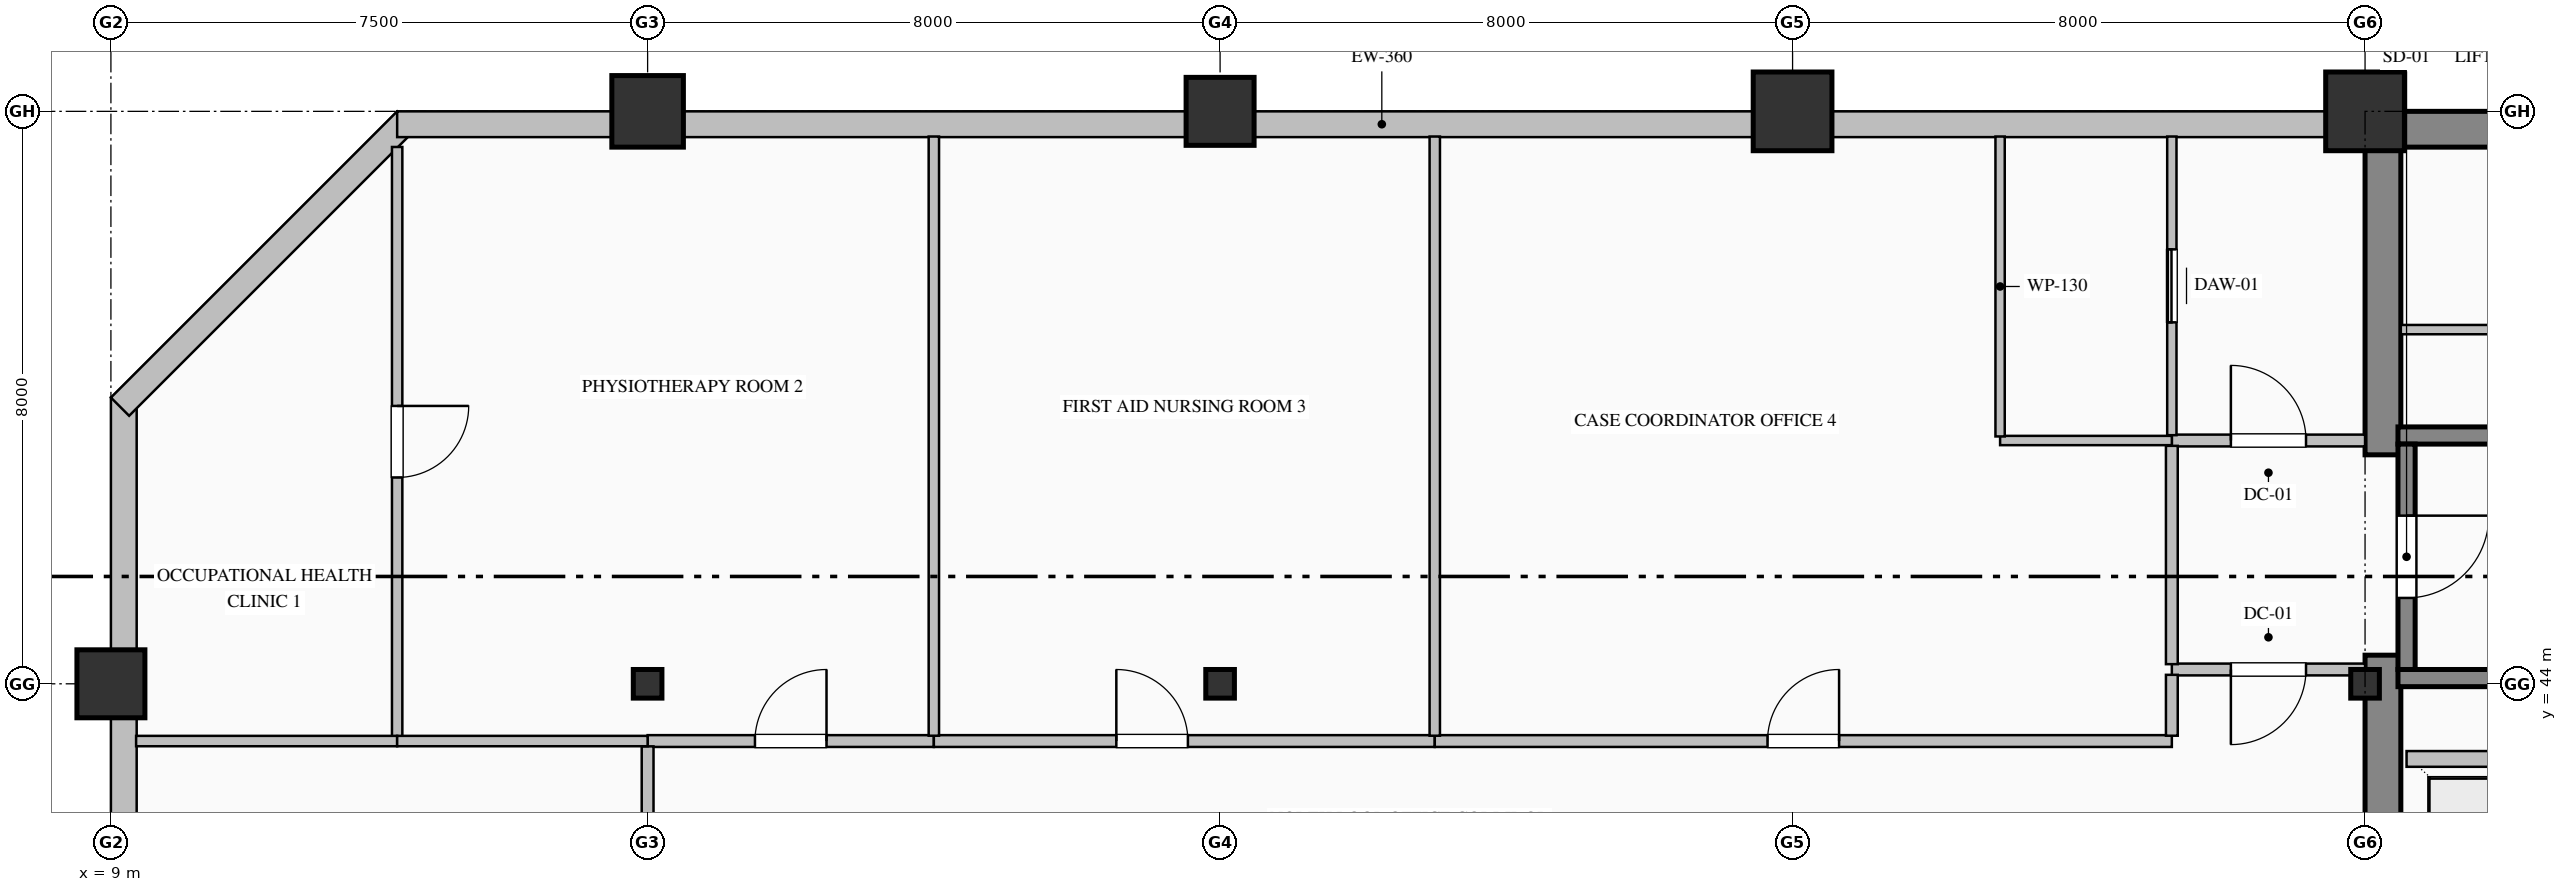
"""IFC4 building model, lengths in metres.
Left out: names, types, materials, properties, quantities, classifications, styles, units other than length and angle.
Written with IfcOpenShell. Run it as: python <this file> out.ifc"""

import sys

from ifc_helpers import new_model, si_unit, direction, frame, frame_2d, origin, origin_2d, place, context, subcontext, project, spatial, rectangle, hollow_rectangle, hollow_circle, i_section, extrude, element, fill, save


model = new_model("IFC4")
c1 = context("Model", 3, precision=1e-05, world=origin(), true_north=direction((0.0, 1.0)))
c2 = subcontext(c1, "Body", "Model", "MODEL_VIEW")
j1 = project(units=[si_unit("LENGTHUNIT", "METRE"), si_unit("PLANEANGLEUNIT", "RADIAN")], contexts=[c1])
p1 = place(None, origin())
s1 = spatial("IfcSite", under=j1, at=p1, CompositionType="ELEMENT")
p2 = place(p1, origin())
s2 = spatial("IfcBuilding", under=s1, at=p2, CompositionType="ELEMENT")
p3 = place(p2, frame((0.0, 0.0, 175.0)))
s3 = spatial("IfcBuildingStorey", under=s2, at=p3, CompositionType="ELEMENT", Elevation=175.0)
p4 = place(p3, frame((40.5, 51.75, 0.0), z_axis=(0.0, 0.0, 1.0), x_axis=(1.0, 0.0, 0.0)))
e1 = element("IfcWall", 1, at=p4, inside=s3, PredefinedType="SHEAR", context=c2, shape_type="SweptSolid", body=[
    extrude(rectangle(XDim=23.5, YDim=0.5, at=frame_2d((11.75, 0.0))), origin(), (0.0, 0.0, 1.0), 3.765),
])
p5 = place(p3, frame((40.75, 36.5, 0.0), z_axis=(0.0, 0.0, 1.0), x_axis=(0.0, 1.0, 0.0)))
e2 = element("IfcWall", 2, at=p5, inside=s3, PredefinedType="SHEAR", context=c2, shape_type="SweptSolid", body=[
    extrude(rectangle(XDim=7.9, YDim=0.5, at=frame_2d((3.95, 0.0))), origin(), (0.0, 0.0, 1.0), 3.765),
])
p6 = place(p3, frame((40.75, 47.2, 0.0), z_axis=(0.0, 0.0, 1.0), x_axis=(0.0, 1.0, 0.0)))
e3 = element("IfcWall", 3, at=p6, inside=s3, PredefinedType="SHEAR", context=c2, shape_type="SweptSolid", body=[
    extrude(rectangle(XDim=4.3, YDim=0.5, at=frame_2d((2.15, 0.0))), origin(), (0.0, 0.0, 1.0), 3.765),
])
p7 = place(p3, frame((9.0, 44.0, 0.0), z_axis=(0.0, 0.0, 1.0), x_axis=(1.0, 0.0, 0.0)))
e4 = element("IfcColumn", 4, at=p7, inside=s3, PredefinedType="COLUMN", context=c2, shape_type="SweptSolid", body=[
    extrude(hollow_rectangle(XDim=0.95, YDim=0.95, WallThickness=0.036, at=origin_2d()), origin(), (0.0, 0.0, 1.0), 4.0),
])
p8 = place(p3, frame((16.5, 44.0, 0.0), z_axis=(0.0, 0.0, 1.0), x_axis=(1.0, 0.0, 0.0)))
e5 = element("IfcColumn", 5, at=p8, inside=s3, PredefinedType="COLUMN", context=c2, shape_type="SweptSolid", body=[
    extrude(i_section(OverallWidth=0.4, OverallDepth=0.4, WebThickness=0.013, FlangeThickness=0.021, FilletRadius=0.022, at=origin_2d()), origin(), (0.0, 0.0, 1.0), 4.0),
])
p9 = place(p3, frame((16.5, 52.0, 0.0), z_axis=(0.0, 0.0, 1.0), x_axis=(1.0, 0.0, 0.0)))
e6 = element("IfcColumn", 6, at=p9, inside=s3, PredefinedType="COLUMN", context=c2, shape_type="SweptSolid", body=[
    extrude(hollow_circle(Radius=0.5, WallThickness=0.036, at=origin_2d()), origin(), (0.0, 0.0, 1.0), 4.0),
])
p10 = place(p3, frame((24.5, 44.0, 0.0), z_axis=(0.0, 0.0, 1.0), x_axis=(1.0, 0.0, 0.0)))
e7 = element("IfcColumn", 7, at=p10, inside=s3, PredefinedType="COLUMN", context=c2, shape_type="SweptSolid", body=[
    extrude(i_section(OverallWidth=0.4, OverallDepth=0.4, WebThickness=0.013, FlangeThickness=0.021, FilletRadius=0.022, at=origin_2d()), origin(), (0.0, 0.0, 1.0), 4.0),
])
p11 = place(p3, frame((24.5, 52.0, 0.0), z_axis=(0.0, 0.0, 1.0), x_axis=(1.0, 0.0, 0.0)))
e8 = element("IfcColumn", 8, at=p11, inside=s3, PredefinedType="COLUMN", context=c2, shape_type="SweptSolid", body=[
    extrude(hollow_rectangle(XDim=0.95, YDim=0.95, WallThickness=0.036, at=origin_2d()), origin(), (0.0, 0.0, 1.0), 4.0),
])
p12 = place(p3, frame((32.5, 52.0, 0.0), z_axis=(0.0, 0.0, 1.0), x_axis=(1.0, 0.0, 0.0)))
e9 = element("IfcColumn", 9, at=p12, inside=s3, PredefinedType="COLUMN", context=c2, shape_type="SweptSolid", body=[
    extrude(hollow_rectangle(XDim=1.1, YDim=1.1, WallThickness=0.04, at=origin_2d()), origin(), (0.0, 0.0, 1.0), 4.0),
])
p13 = place(p3, frame((40.5, 44.0, 0.0), z_axis=(0.0, 0.0, 1.0), x_axis=(1.0, 0.0, 0.0)))
e10 = element("IfcColumn", 10, at=p13, inside=s3, PredefinedType="COLUMN", context=c2, shape_type="SweptSolid", body=[
    extrude(i_section(OverallWidth=0.4, OverallDepth=0.4, WebThickness=0.013, FlangeThickness=0.021, FilletRadius=0.022, at=origin_2d()), origin(), (0.0, 0.0, 1.0), 4.0),
])
p14 = place(p3, frame((40.5, 52.0, 0.0), z_axis=(0.0, 0.0, 1.0), x_axis=(1.0, 0.0, 0.0)))
e11 = element("IfcColumn", 11, at=p14, inside=s3, PredefinedType="COLUMN", context=c2, shape_type="SweptSolid", body=[
    extrude(hollow_rectangle(XDim=1.1, YDim=1.1, WallThickness=0.04, at=origin_2d()), origin(), (0.0, 0.0, 1.0), 4.0),
])
p15 = place(p3, frame((9.18, 32.0, 0.0), z_axis=(0.0, 0.0, 1.0), x_axis=(0.0, 1.0, 0.0)))
e12 = element("IfcWall", 12, at=p15, inside=s3, PredefinedType="SOLIDWALL", context=c2, shape_type="SweptSolid", body=[
    extrude(rectangle(XDim=16.0, YDim=0.36, at=frame_2d((8.0, 0.0))), origin(), (0.0, 0.0, 1.0), 3.265),
])
p16 = place(p15, frame((6.375, 0.0, 0.85)))
e13 = element("IfcOpeningElement", 13, at=p16, cuts=e12, PredefinedType="OPENING", context=c2, shape_type="SweptSolid", body=[
    extrude(rectangle(XDim=1.65, YDim=1.95, at=frame_2d((0.825, 0.975))), frame((0.0, 0.19, 0.0), z_axis=(0.0, -1.0, 0.0), x_axis=(1.0, 0.0, 0.0)), (0.0, 0.0, 1.0), 0.38),
])
p17 = place(p3, frame((9.127, 47.873, 0.0), z_axis=(0.0, 0.0, 1.0), x_axis=(0.707106781187, 0.707106781187, 0.0)))
e14 = element("IfcWall", 14, at=p17, inside=s3, PredefinedType="SOLIDWALL", context=c2, shape_type="SweptSolid", body=[
    extrude(rectangle(XDim=5.657, YDim=0.36, at=frame_2d((2.828, 0.0))), origin(), (0.0, 0.0, 1.0), 3.765),
])
p18 = place(p3, frame((13.0, 51.82, 0.0), z_axis=(0.0, 0.0, 1.0), x_axis=(1.0, 0.0, 0.0)))
e15 = element("IfcWall", 15, at=p18, inside=s3, PredefinedType="SOLIDWALL", context=c2, shape_type="SweptSolid", body=[
    extrude(rectangle(XDim=27.52, YDim=0.36, at=frame_2d((13.76, 0.0))), origin(), (0.0, 0.0, 1.0), 3.265),
])
for number, where, z_axis, x_axis in (
    (16, (40.96, 47.47, 0.0), (0.0, 0.0, 1.0), (1.0, 0.0, 0.0)),
    (17, (49.04, 44.08, 0.0), (0.0, 0.0, 1.0), (-1.0, 0.0, 0.0)),
):
    element("IfcWall", number, at=place(p3, frame(where, z_axis=z_axis, x_axis=x_axis)), inside=s3, PredefinedType="SOLIDWALL", context=c2, shape_type="SweptSolid", body=[
        extrude(rectangle(XDim=8.08, YDim=0.24, at=frame_2d((4.04, 0.0))), origin(), (0.0, 0.0, 1.0), 4.0),
    ])
p19 = place(p3, frame((41.08, 47.35, 0.0), z_axis=(0.0, 0.0, 1.0), x_axis=(0.0, -1.0, 0.0)))
e18 = element("IfcWall", 18, at=p19, inside=s3, PredefinedType="SOLIDWALL", context=c2, shape_type="SweptSolid", body=[
    extrude(rectangle(XDim=3.15, YDim=0.24, at=frame_2d((1.575, 0.0))), origin(), (0.0, 0.0, 1.0), 4.0),
])
p20 = place(p19, frame((1.0, 0.0, 0.0)))
e19 = element("IfcOpeningElement", 19, at=p20, cuts=e18, PredefinedType="OPENING", context=c2, shape_type="SweptSolid", body=[
    extrude(rectangle(XDim=1.15, YDim=2.2, at=frame_2d((0.575, 1.1))), frame((0.0, 0.13, 0.0), z_axis=(0.0, -1.0, 0.0), x_axis=(1.0, 0.0, 0.0)), (0.0, 0.0, 1.0), 0.26),
])
p21 = place(p3, frame((41.08, 42.95, 0.0), z_axis=(0.0, 0.0, 1.0), x_axis=(1.0, 0.0, 0.0)))
e20 = element("IfcWall", 20, at=p21, inside=s3, PredefinedType="PARTITIONING", context=c2, shape_type="SweptSolid", body=[
    extrude(rectangle(XDim=8.24, YDim=0.22, at=frame_2d((4.12, 0.0))), origin(), (0.0, 0.0, 1.0), 3.765),
])
p22 = place(p3, frame((37.8, 47.4, 0.0), z_axis=(0.0, 0.0, 1.0), x_axis=(1.0, 0.0, 0.0)))
e21 = element("IfcWall", 21, at=p22, inside=s3, PredefinedType="PARTITIONING", context=c2, shape_type="SweptSolid", body=[
    extrude(rectangle(XDim=2.7, YDim=0.165, at=frame_2d((1.35, 0.0))), origin(), (0.0, 0.0, 1.0), 3.765),
])
p23 = place(p22, frame((0.825, 0.0, 0.0)))
e22 = element("IfcOpeningElement", 22, at=p23, cuts=e21, PredefinedType="OPENING", context=c2, shape_type="SweptSolid", body=[
    extrude(rectangle(XDim=1.05, YDim=2.15, at=frame_2d((0.525, 1.075))), frame((0.0, 0.093, 0.0), z_axis=(0.0, -1.0, 0.0), x_axis=(1.0, 0.0, 0.0)), (0.0, 0.0, 1.0), 0.185),
])
p24 = place(p3, frame((40.5, 44.2, 0.0), z_axis=(0.0, 0.0, 1.0), x_axis=(-1.0, 0.0, 0.0)))
e23 = element("IfcWall", 23, at=p24, inside=s3, PredefinedType="PARTITIONING", context=c2, shape_type="SweptSolid", body=[
    extrude(rectangle(XDim=2.7, YDim=0.165, at=frame_2d((1.35, 0.0))), origin(), (0.0, 0.0, 1.0), 3.765),
])
p25 = place(p24, frame((0.825, 0.0, 0.0)))
e24 = element("IfcOpeningElement", 24, at=p25, cuts=e23, PredefinedType="OPENING", context=c2, shape_type="SweptSolid", body=[
    extrude(rectangle(XDim=1.05, YDim=2.15, at=frame_2d((0.525, 1.075))), frame((0.0, 0.093, 0.0), z_axis=(0.0, -1.0, 0.0), x_axis=(1.0, 0.0, 0.0)), (0.0, 0.0, 1.0), 0.185),
])
p26 = place(p3, frame((37.8, 44.274, 0.0), z_axis=(0.0, 0.0, 1.0), x_axis=(0.0, 1.0, 0.0)))
e25 = element("IfcWall", 25, at=p26, inside=s3, PredefinedType="PARTITIONING", context=c2, shape_type="SweptSolid", body=[
    extrude(rectangle(XDim=3.051, YDim=0.165, at=frame_2d((1.525, 0.0))), origin(), (0.0, 0.0, 1.0), 3.765),
])
p27 = place(p3, frame((37.8, 47.475, 0.0), z_axis=(0.0, 0.0, 1.0), x_axis=(0.0, 1.0, 0.0)))
e26 = element("IfcWall", 26, at=p27, inside=s3, PredefinedType="PARTITIONING", context=c2, shape_type="SweptSolid", body=[
    extrude(rectangle(XDim=4.173, YDim=0.13, at=frame_2d((2.087, 0.0))), origin(), (0.0, 0.0, 1.0), 3.765),
])
p28 = place(p27, frame((1.577, 0.0, 0.0)))
e27 = element("IfcOpeningElement", 27, at=p28, cuts=e26, PredefinedType="OPENING", context=c2, shape_type="SweptSolid", body=[
    extrude(rectangle(XDim=1.02, YDim=2.15, at=frame_2d((0.51, 1.075))), frame((0.0, 0.075, 0.0), z_axis=(0.0, -1.0, 0.0), x_axis=(1.0, 0.0, 0.0)), (0.0, 0.0, 1.0), 0.15),
])
p29 = place(p3, frame((37.8, 47.4, 0.0), z_axis=(0.0, 0.0, 1.0), x_axis=(-1.0, 0.0, 0.0)))
e28 = element("IfcWall", 28, at=p29, inside=s3, PredefinedType="PARTITIONING", context=c2, shape_type="SweptSolid", body=[
    extrude(rectangle(XDim=2.4, YDim=0.13, at=frame_2d((1.2, 0.0))), origin(), (0.0, 0.0, 1.0), 3.765),
])
p30 = place(p3, frame((35.4, 47.457, 0.0), z_axis=(0.0, 0.0, 1.0), x_axis=(0.0, 1.0, 0.0)))
e29 = element("IfcWall", 29, at=p30, inside=s3, PredefinedType="PARTITIONING", context=c2, shape_type="SweptSolid", body=[
    extrude(rectangle(XDim=4.191, YDim=0.13, at=frame_2d((2.095, 0.0))), origin(), (0.0, 0.0, 1.0), 3.765),
])
p31 = place(p3, frame((41.0, 48.95, 0.0), z_axis=(0.0, 0.0, 1.0), x_axis=(1.0, 0.0, 0.0)))
e30 = element("IfcWall", 30, at=p31, inside=s3, PredefinedType="PARTITIONING", context=c2, shape_type="SweptSolid", body=[
    extrude(rectangle(XDim=5.8, YDim=0.13, at=frame_2d((2.9, 0.0))), origin(), (0.0, 0.0, 1.0), 3.765),
])
p32 = place(p31, frame((2.44, 0.0, 0.0)))
e31 = element("IfcOpeningElement", 31, at=p32, cuts=e30, PredefinedType="OPENING", context=c2, shape_type="SweptSolid", body=[
    extrude(rectangle(XDim=0.92, YDim=2.15, at=frame_2d((0.46, 1.075))), frame((0.0, 0.075, 0.0), z_axis=(0.0, -1.0, 0.0), x_axis=(1.0, 0.0, 0.0)), (0.0, 0.0, 1.0), 0.15),
])
p33 = place(p3, frame((16.5, 43.2, 0.0), z_axis=(0.0, 0.0, 1.0), x_axis=(1.0, 0.0, 0.0)))
e32 = element("IfcWall", 32, at=p33, inside=s3, PredefinedType="PARTITIONING", context=c2, shape_type="SweptSolid", body=[
    extrude(rectangle(XDim=4.0, YDim=0.165, at=frame_2d((2.0, 0.0))), origin(), (0.0, 0.0, 1.0), 3.765),
])
p34 = place(p33, frame((1.5, 0.0, 0.0)))
e33 = element("IfcOpeningElement", 33, at=p34, cuts=e32, PredefinedType="OPENING", context=c2, shape_type="SweptSolid", body=[
    extrude(rectangle(XDim=1.0, YDim=2.15, at=frame_2d((0.5, 1.075))), frame((0.0, 0.093, 0.0), z_axis=(0.0, -1.0, 0.0), x_axis=(1.0, 0.0, 0.0)), (0.0, 0.0, 1.0), 0.185),
])
p35 = place(p3, frame((20.5, 43.2, 0.0), z_axis=(0.0, 0.0, 1.0), x_axis=(1.0, 0.0, 0.0)))
e34 = element("IfcWall", 34, at=p35, inside=s3, PredefinedType="PARTITIONING", context=c2, shape_type="SweptSolid", body=[
    extrude(rectangle(XDim=7.0, YDim=0.165, at=frame_2d((3.5, 0.0))), origin(), (0.0, 0.0, 1.0), 3.765),
])
p36 = place(p35, frame((2.55, 0.0, 0.0)))
e35 = element("IfcOpeningElement", 35, at=p36, cuts=e34, PredefinedType="OPENING", context=c2, shape_type="SweptSolid", body=[
    extrude(rectangle(XDim=1.0, YDim=2.15, at=frame_2d((0.5, 1.075))), frame((0.0, 0.093, 0.0), z_axis=(0.0, -1.0, 0.0), x_axis=(1.0, 0.0, 0.0)), (0.0, 0.0, 1.0), 0.185),
])
p37 = place(p3, frame((27.5, 43.2, 0.0), z_axis=(0.0, 0.0, 1.0), x_axis=(1.0, 0.0, 0.0)))
e36 = element("IfcWall", 36, at=p37, inside=s3, PredefinedType="PARTITIONING", context=c2, shape_type="SweptSolid", body=[
    extrude(rectangle(XDim=10.3, YDim=0.165, at=frame_2d((5.15, 0.0))), origin(), (0.0, 0.0, 1.0), 3.765),
])
p38 = place(p37, frame((4.65, 0.0, 0.0)))
e37 = element("IfcOpeningElement", 37, at=p38, cuts=e36, PredefinedType="OPENING", context=c2, shape_type="SweptSolid", body=[
    extrude(rectangle(XDim=1.0, YDim=2.15, at=frame_2d((0.5, 1.075))), frame((0.0, 0.093, 0.0), z_axis=(0.0, -1.0, 0.0), x_axis=(1.0, 0.0, 0.0)), (0.0, 0.0, 1.0), 0.185),
])
p39 = place(p3, frame((16.5, 41.0, 0.0), z_axis=(0.0, 0.0, 1.0), x_axis=(0.0, 1.0, 0.0)))
e38 = element("IfcWall", 38, at=p39, inside=s3, PredefinedType="PARTITIONING", context=c2, shape_type="SweptSolid", body=[
    extrude(rectangle(XDim=2.125, YDim=0.165, at=frame_2d((1.063, 0.0))), origin(), (0.0, 0.0, 1.0), 3.157),
])
p40 = place(p3, frame((37.8, 43.274, 0.0), z_axis=(0.0, 0.0, 1.0), x_axis=(0.0, 1.0, 0.0)))
e39 = element("IfcWall", 39, at=p40, inside=s3, PredefinedType="PARTITIONING", context=c2, shape_type="SweptSolid", body=[
    extrude(rectangle(XDim=0.851, YDim=0.165, at=frame_2d((0.426, 0.0))), origin(), (0.0, 0.0, 1.0), 3.765),
])
p41 = place(p3, frame((13.0, 51.502, 0.0), z_axis=(0.0, 0.0, 1.0), x_axis=(0.0, -1.0, 0.0)))
e40 = element("IfcWall", 40, at=p41, inside=s3, PredefinedType="PARTITIONING", context=c2, shape_type="SweptSolid", body=[
    extrude(rectangle(XDim=8.238, YDim=0.145, at=frame_2d((4.119, 0.0))), origin(), (0.0, 0.0, 1.0), 3.765),
])
p42 = place(p41, frame((3.619, 0.0, 0.0)))
e41 = element("IfcOpeningElement", 41, at=p42, cuts=e40, PredefinedType="OPENING", context=c2, shape_type="SweptSolid", body=[
    extrude(rectangle(XDim=1.0, YDim=2.15, at=frame_2d((0.5, 1.075))), frame((0.0, 0.083, 0.0), z_axis=(0.0, -1.0, 0.0), x_axis=(1.0, 0.0, 0.0)), (0.0, 0.0, 1.0), 0.165),
])
p43 = place(p3, frame((13.0, 43.2, 0.0), z_axis=(0.0, 0.0, 1.0), x_axis=(-1.0, 0.0, 0.0)))
e42 = element("IfcWall", 42, at=p43, inside=s3, PredefinedType="PARTITIONING", context=c2, shape_type="SweptSolid", body=[
    extrude(rectangle(XDim=3.648, YDim=0.145, at=frame_2d((1.824, 0.0))), origin(), (0.0, 0.0, 1.0), 3.765),
])
p44 = place(p3, frame((20.5, 51.648, 0.0), z_axis=(0.0, 0.0, 1.0), x_axis=(0.0, -1.0, 0.0)))
e43 = element("IfcWall", 43, at=p44, inside=s3, PredefinedType="PARTITIONING", context=c2, shape_type="SweptSolid", body=[
    extrude(rectangle(XDim=8.374, YDim=0.145, at=frame_2d((4.187, 0.0))), origin(), (0.0, 0.0, 1.0), 3.765),
])
p45 = place(p3, frame((16.5, 43.2, 0.0), z_axis=(0.0, 0.0, 1.0), x_axis=(-1.0, 0.0, 0.0)))
e44 = element("IfcWall", 44, at=p45, inside=s3, PredefinedType="PARTITIONING", context=c2, shape_type="SweptSolid", body=[
    extrude(rectangle(XDim=3.5, YDim=0.145, at=frame_2d((1.75, 0.0))), origin(), (0.0, 0.0, 1.0), 3.765),
])
p46 = place(p3, frame((27.5, 51.648, 0.0), z_axis=(0.0, 0.0, 1.0), x_axis=(0.0, -1.0, 0.0)))
e45 = element("IfcWall", 45, at=p46, inside=s3, PredefinedType="PARTITIONING", context=c2, shape_type="SweptSolid", body=[
    extrude(rectangle(XDim=8.374, YDim=0.145, at=frame_2d((4.187, 0.0))), origin(), (0.0, 0.0, 1.0), 3.765),
])
p47 = place(p20, origin())
e46 = element("IfcDoor", 46, at=p47, inside=s3, OperationType="SINGLE_SWING_LEFT", PredefinedType="DOOR", context=c2, shape_type="SweptSolid", body=[
    extrude(rectangle(XDim=1.15, YDim=2.2, at=frame_2d((0.575, 1.1))), frame((0.0, 0.025, 0.0), z_axis=(0.0, -1.0, 0.0), x_axis=(1.0, 0.0, 0.0)), (0.0, 0.0, 1.0), 0.05),
])
fill(e19, e46)
p48 = place(p23, origin())
e47 = element("IfcDoor", 47, at=p48, inside=s3, OperationType="SINGLE_SWING_LEFT", PredefinedType="DOOR", context=c2, shape_type="SweptSolid", body=[
    extrude(rectangle(XDim=1.05, YDim=2.15, at=frame_2d((0.525, 1.075))), frame((0.0, 0.025, 0.0), z_axis=(0.0, -1.0, 0.0), x_axis=(1.0, 0.0, 0.0)), (0.0, 0.0, 1.0), 0.05),
])
fill(e22, e47)
p49 = place(p25, origin())
e48 = element("IfcDoor", 48, at=p49, inside=s3, OperationType="SINGLE_SWING_RIGHT", PredefinedType="DOOR", context=c2, shape_type="SweptSolid", body=[
    extrude(rectangle(XDim=1.05, YDim=2.15, at=frame_2d((0.525, 1.075))), frame((0.0, 0.025, 0.0), z_axis=(0.0, -1.0, 0.0), x_axis=(1.0, 0.0, 0.0)), (0.0, 0.0, 1.0), 0.05),
])
fill(e24, e48)
p50 = place(p28, origin())
e49 = element("IfcDoor", 49, at=p50, inside=s3, OperationType="SLIDING_TO_LEFT", PredefinedType="DOOR", context=c2, shape_type="SweptSolid", body=[
    extrude(rectangle(XDim=1.02, YDim=2.15, at=frame_2d((0.51, 1.075))), frame((0.0, 0.025, 0.0), z_axis=(0.0, -1.0, 0.0), x_axis=(1.0, 0.0, 0.0)), (0.0, 0.0, 1.0), 0.05),
])
fill(e27, e49)
p51 = place(p42, origin())
e50 = element("IfcDoor", 50, at=p51, inside=s3, OperationType="SINGLE_SWING_LEFT", PredefinedType="DOOR", context=c2, shape_type="SweptSolid", body=[
    extrude(rectangle(XDim=1.0, YDim=2.15, at=frame_2d((0.5, 1.075))), frame((0.0, 0.025, 0.0), z_axis=(0.0, -1.0, 0.0), x_axis=(1.0, 0.0, 0.0)), (0.0, 0.0, 1.0), 0.05),
])
fill(e41, e50)
p52 = place(p34, origin())
e51 = element("IfcDoor", 51, at=p52, inside=s3, OperationType="SINGLE_SWING_RIGHT", PredefinedType="DOOR", context=c2, shape_type="SweptSolid", body=[
    extrude(rectangle(XDim=1.0, YDim=2.15, at=frame_2d((0.5, 1.075))), frame((0.0, 0.025, 0.0), z_axis=(0.0, -1.0, 0.0), x_axis=(1.0, 0.0, 0.0)), (0.0, 0.0, 1.0), 0.05),
])
fill(e33, e51)
p53 = place(p36, origin())
e52 = element("IfcDoor", 52, at=p53, inside=s3, OperationType="SINGLE_SWING_LEFT", PredefinedType="DOOR", context=c2, shape_type="SweptSolid", body=[
    extrude(rectangle(XDim=1.0, YDim=2.15, at=frame_2d((0.5, 1.075))), frame((0.0, 0.025, 0.0), z_axis=(0.0, -1.0, 0.0), x_axis=(1.0, 0.0, 0.0)), (0.0, 0.0, 1.0), 0.05),
])
fill(e35, e52)
p54 = place(p38, origin())
e53 = element("IfcDoor", 53, at=p54, inside=s3, OperationType="SINGLE_SWING_RIGHT", PredefinedType="DOOR", context=c2, shape_type="SweptSolid", body=[
    extrude(rectangle(XDim=1.0, YDim=2.15, at=frame_2d((0.5, 1.075))), frame((0.0, 0.025, 0.0), z_axis=(0.0, -1.0, 0.0), x_axis=(1.0, 0.0, 0.0)), (0.0, 0.0, 1.0), 0.05),
])
fill(e37, e53)
save(model, sys.argv[1])
